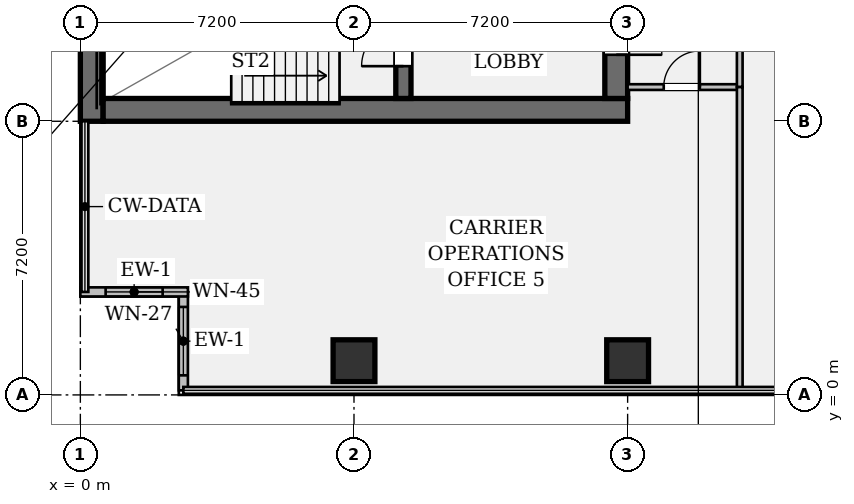
"""IFC4 building model, lengths in metres.
Left out: names, types, materials, properties, quantities, classifications, styles, units other than length and angle.
Written with IfcOpenShell. Run it as: python <this file> out.ifc"""

import sys

from ifc_helpers import new_model, si_unit, direction, frame, frame_2d, origin, origin_2d, place, context, subcontext, project, spatial, rectangle, hollow_rectangle, extrude, element, fill, save


model = new_model("IFC4")
c1 = context("Model", 3, precision=1e-05, world=origin(), true_north=direction((0.0, 1.0)))
c2 = subcontext(c1, "Body", "Model", "MODEL_VIEW")
j1 = project(units=[si_unit("LENGTHUNIT", "METRE"), si_unit("PLANEANGLEUNIT", "RADIAN")], contexts=[c1])
p1 = place(None, origin())
s1 = spatial("IfcSite", under=j1, at=p1, CompositionType="ELEMENT")
p2 = place(p1, origin())
s2 = spatial("IfcBuilding", under=s1, at=p2, CompositionType="ELEMENT")
p3 = place(p2, frame((0.0, 0.0, 35.0)))
s3 = spatial("IfcBuildingStorey", under=s2, at=p3, CompositionType="ELEMENT", Elevation=35.0)
p4 = place(p3, frame((0.3, 7.2, 0.0), z_axis=(0.0, 0.0, 1.0), x_axis=(0.0, 1.0, 0.0)))
e1 = element("IfcWall", 1, at=p4, inside=s3, PredefinedType="SHEAR", context=c2, shape_type="SweptSolid", body=[
    extrude(rectangle(XDim=28.8, YDim=0.6, at=frame_2d((14.4, 0.0))), origin(), (0.0, 0.0, 1.0), 3.57),
])
p5 = place(p3, frame((0.6, 7.5, 0.0), z_axis=(0.0, 0.0, 1.0), x_axis=(1.0, 0.0, 0.0)))
e2 = element("IfcWall", 2, at=p5, inside=s3, PredefinedType="SHEAR", context=c2, shape_type="SweptSolid", body=[
    extrude(rectangle(XDim=13.8, YDim=0.6, at=frame_2d((6.9, 0.0))), origin(), (0.0, 0.0, 1.0), 3.57),
])
p6 = place(p3, frame((14.1, 35.4, 0.0), z_axis=(0.0, 0.0, 1.0), x_axis=(0.0, -1.0, 0.0)))
e3 = element("IfcWall", 3, at=p6, inside=s3, PredefinedType="SHEAR", context=c2, shape_type="SweptSolid", body=[
    extrude(rectangle(XDim=27.6, YDim=0.6, at=frame_2d((13.8, 0.0))), origin(), (0.0, 0.0, 1.0), 3.57),
])
p7 = place(p6, frame((1.3, 0.0, 0.0)))
e4 = element("IfcOpeningElement", 4, at=p7, cuts=e3, PredefinedType="OPENING", context=c2, shape_type="SweptSolid", body=[
    extrude(rectangle(XDim=1.2, YDim=2.15, at=frame_2d((0.6, 1.075))), frame((0.0, 0.312, 0.0), z_axis=(0.0, -1.0, 0.0), x_axis=(1.0, 0.0, 0.0)), (0.0, 0.0, 1.0), 0.624),
])
p8 = place(p6, frame((25.25, 0.0, 0.0)))
e5 = element("IfcOpeningElement", 5, at=p8, cuts=e3, PredefinedType="OPENING", context=c2, shape_type="SweptSolid", body=[
    extrude(rectangle(XDim=1.2, YDim=2.15, at=frame_2d((0.6, 1.075))), frame((0.0, 0.312, 0.0), z_axis=(0.0, -1.0, 0.0), x_axis=(1.0, 0.0, 0.0)), (0.0, 0.0, 1.0), 0.624),
])
p9 = place(p6, frame((14.6, 0.0, 0.0)))
e6 = element("IfcOpeningElement", 6, at=p9, cuts=e3, PredefinedType="OPENING", context=c2, shape_type="SweptSolid", body=[
    extrude(rectangle(XDim=1.6, YDim=2.2, at=frame_2d((0.8, 1.1))), frame((0.0, 0.312, 0.0), z_axis=(0.0, -1.0, 0.0), x_axis=(1.0, 0.0, 0.0)), (0.0, 0.0, 1.0), 0.624),
])
p10 = place(p3, frame((8.5, 7.8, 0.0), z_axis=(0.0, 0.0, 1.0), x_axis=(0.0, 1.0, 0.0)))
e7 = element("IfcWall", 7, at=p10, inside=s3, PredefinedType="SHEAR", context=c2, shape_type="SweptSolid", body=[
    extrude(rectangle(XDim=3.68, YDim=0.4, at=frame_2d((1.84, 0.0))), origin(), (0.0, 0.0, 1.0), 3.57),
])
p11 = place(p10, frame((0.85, 0.0, 0.0)))
e8 = element("IfcOpeningElement", 8, at=p11, cuts=e7, PredefinedType="OPENING", context=c2, shape_type="SweptSolid", body=[
    extrude(rectangle(XDim=1.1, YDim=2.15, at=frame_2d((0.55, 1.075))), frame((0.0, 0.212, 0.0), z_axis=(0.0, -1.0, 0.0), x_axis=(1.0, 0.0, 0.0)), (0.0, 0.0, 1.0), 0.424),
])
for number, where, z_axis, x_axis in (
    (9, (7.2, 0.9, 0.0), (0.0, 0.0, 1.0), (1.0, 0.0, 0.0)),
    (10, (14.4, 0.9, 0.0), (0.0, 0.0, 1.0), (1.0, 0.0, 0.0)),
):
    element("IfcColumn", number, at=place(p3, frame(where, z_axis=z_axis, x_axis=x_axis)), inside=s3, PredefinedType="COLUMN", context=c2, shape_type="SweptSolid", body=[
        extrude(hollow_rectangle(XDim=1.1, YDim=1.1, WallThickness=0.07, at=origin_2d()), origin(), (0.0, 0.0, 1.0), 3.57),
    ])
p12 = place(p3, frame((2.71, 0.12, 0.0), z_axis=(0.0, 0.0, 1.0), x_axis=(0.0, 1.0, 0.0)))
e11 = element("IfcWall", 11, at=p12, inside=s3, PredefinedType="STANDARD", context=c2, shape_type="SweptSolid", body=[
    extrude(rectangle(XDim=2.59, YDim=0.24, at=frame_2d((1.295, 0.0))), origin(), (0.0, 0.0, 1.0), 3.57),
])
p13 = place(p12, frame((0.395, 0.0, 0.95)))
e12 = element("IfcOpeningElement", 12, at=p13, cuts=e11, PredefinedType="OPENING", context=c2, shape_type="SweptSolid", body=[
    extrude(rectangle(XDim=1.8, YDim=1.35, at=frame_2d((0.9, 0.675))), frame((0.0, 0.132, 0.0), z_axis=(0.0, -1.0, 0.0), x_axis=(1.0, 0.0, 0.0)), (0.0, 0.0, 1.0), 0.264),
])
p14 = place(p3, frame((2.83, 2.71, 0.0), z_axis=(0.0, 0.0, 1.0), x_axis=(-1.0, 0.0, 0.0)))
e13 = element("IfcWall", 13, at=p14, inside=s3, PredefinedType="STANDARD", context=c2, shape_type="SweptSolid", body=[
    extrude(rectangle(XDim=2.83, YDim=0.24, at=frame_2d((1.415, 0.0))), origin(), (0.0, 0.0, 1.0), 3.57),
])
p15 = place(p14, frame((0.665, 0.0, 0.95)))
e14 = element("IfcOpeningElement", 14, at=p15, cuts=e13, PredefinedType="OPENING", context=c2, shape_type="SweptSolid", body=[
    extrude(rectangle(XDim=1.5, YDim=1.8, at=frame_2d((0.75, 0.9))), frame((0.0, 0.132, 0.0), z_axis=(0.0, -1.0, 0.0), x_axis=(1.0, 0.0, 0.0)), (0.0, 0.0, 1.0), 0.264),
])
p16 = place(p3, frame((14.4, 8.1, 0.0), z_axis=(0.0, 0.0, 1.0), x_axis=(1.0, 0.0, 0.0)))
e15 = element("IfcWall", 15, at=p16, inside=s3, PredefinedType="PARTITIONING", context=c2, shape_type="SweptSolid", body=[
    extrude(rectangle(XDim=2.95, YDim=0.15, at=frame_2d((1.475, 0.0))), origin(), (0.0, 0.0, 1.0), 2.628),
])
p17 = place(p16, frame((0.95, 0.0, 0.0)))
e16 = element("IfcOpeningElement", 16, at=p17, cuts=e15, PredefinedType="OPENING", context=c2, shape_type="SweptSolid", body=[
    extrude(rectangle(XDim=0.95, YDim=2.15, at=frame_2d((0.475, 1.075))), frame((0.0, 0.087, 0.0), z_axis=(0.0, -1.0, 0.0), x_axis=(1.0, 0.0, 0.0)), (0.0, 0.0, 1.0), 0.174),
])
p18 = place(p3, frame((17.35, 8.1, 0.0), z_axis=(0.0, 0.0, 1.0), x_axis=(0.0, 1.0, 0.0)))
e17 = element("IfcWall", 17, at=p18, inside=s3, PredefinedType="PARTITIONING", context=c2, shape_type="SweptSolid", body=[
    extrude(rectangle(XDim=2.6, YDim=0.15, at=frame_2d((1.3, 0.0))), origin(), (0.0, 0.0, 1.0), 3.57),
])
p19 = place(p3, frame((17.35, 0.12, 0.0), z_axis=(0.0, 0.0, 1.0), x_axis=(0.0, 1.0, 0.0)))
e18 = element("IfcWall", 18, at=p19, inside=s3, PredefinedType="PARTITIONING", context=c2, shape_type="SweptSolid", body=[
    extrude(rectangle(XDim=7.98, YDim=0.15, at=frame_2d((3.99, 0.0))), origin(), (0.0, 0.0, 1.0), 2.628),
])
p20 = place(p13, origin())
e19 = element("IfcWindow", 19, at=p20, inside=s3, PartitioningType="SINGLE_PANEL", PredefinedType="WINDOW", context=c2, shape_type="SweptSolid", body=[
    extrude(rectangle(XDim=1.8, YDim=1.35, at=frame_2d((0.9, 0.675))), frame((0.0, 0.03, 0.0), z_axis=(0.0, -1.0, 0.0), x_axis=(1.0, 0.0, 0.0)), (0.0, 0.0, 1.0), 0.06),
])
fill(e12, e19)
p21 = place(p15, origin())
e20 = element("IfcWindow", 20, at=p21, inside=s3, PartitioningType="SINGLE_PANEL", PredefinedType="WINDOW", context=c2, shape_type="SweptSolid", body=[
    extrude(rectangle(XDim=1.5, YDim=1.8, at=frame_2d((0.75, 0.9))), frame((0.0, 0.03, 0.0), z_axis=(0.0, -1.0, 0.0), x_axis=(1.0, 0.0, 0.0)), (0.0, 0.0, 1.0), 0.06),
])
fill(e14, e20)
p22 = place(p11, origin())
e21 = element("IfcDoor", 21, at=p22, inside=s3, OperationType="SINGLE_SWING_LEFT", PredefinedType="DOOR", context=c2, shape_type="SweptSolid", body=[
    extrude(rectangle(XDim=1.1, YDim=2.15, at=frame_2d((0.55, 1.075))), frame((0.0, 0.025, 0.0), z_axis=(0.0, -1.0, 0.0), x_axis=(1.0, 0.0, 0.0)), (0.0, 0.0, 1.0), 0.05),
])
fill(e8, e21)
p23 = place(p8, origin())
e22 = element("IfcDoor", 22, at=p23, inside=s3, OperationType="SINGLE_SWING_RIGHT", PredefinedType="DOOR", context=c2, shape_type="SweptSolid", body=[
    extrude(rectangle(XDim=1.2, YDim=2.15, at=frame_2d((0.6, 1.075))), frame((0.0, 0.025, 0.0), z_axis=(0.0, -1.0, 0.0), x_axis=(1.0, 0.0, 0.0)), (0.0, 0.0, 1.0), 0.05),
])
fill(e5, e22)
p24 = place(p17, origin())
e23 = element("IfcDoor", 23, at=p24, inside=s3, OperationType="SINGLE_SWING_RIGHT", PredefinedType="DOOR", context=c2, shape_type="SweptSolid", body=[
    extrude(rectangle(XDim=0.95, YDim=2.15, at=frame_2d((0.475, 1.075))), frame((0.0, 0.025, 0.0), z_axis=(0.0, -1.0, 0.0), x_axis=(1.0, 0.0, 0.0)), (0.0, 0.0, 1.0), 0.05),
])
fill(e16, e23)
save(model, sys.argv[1])
